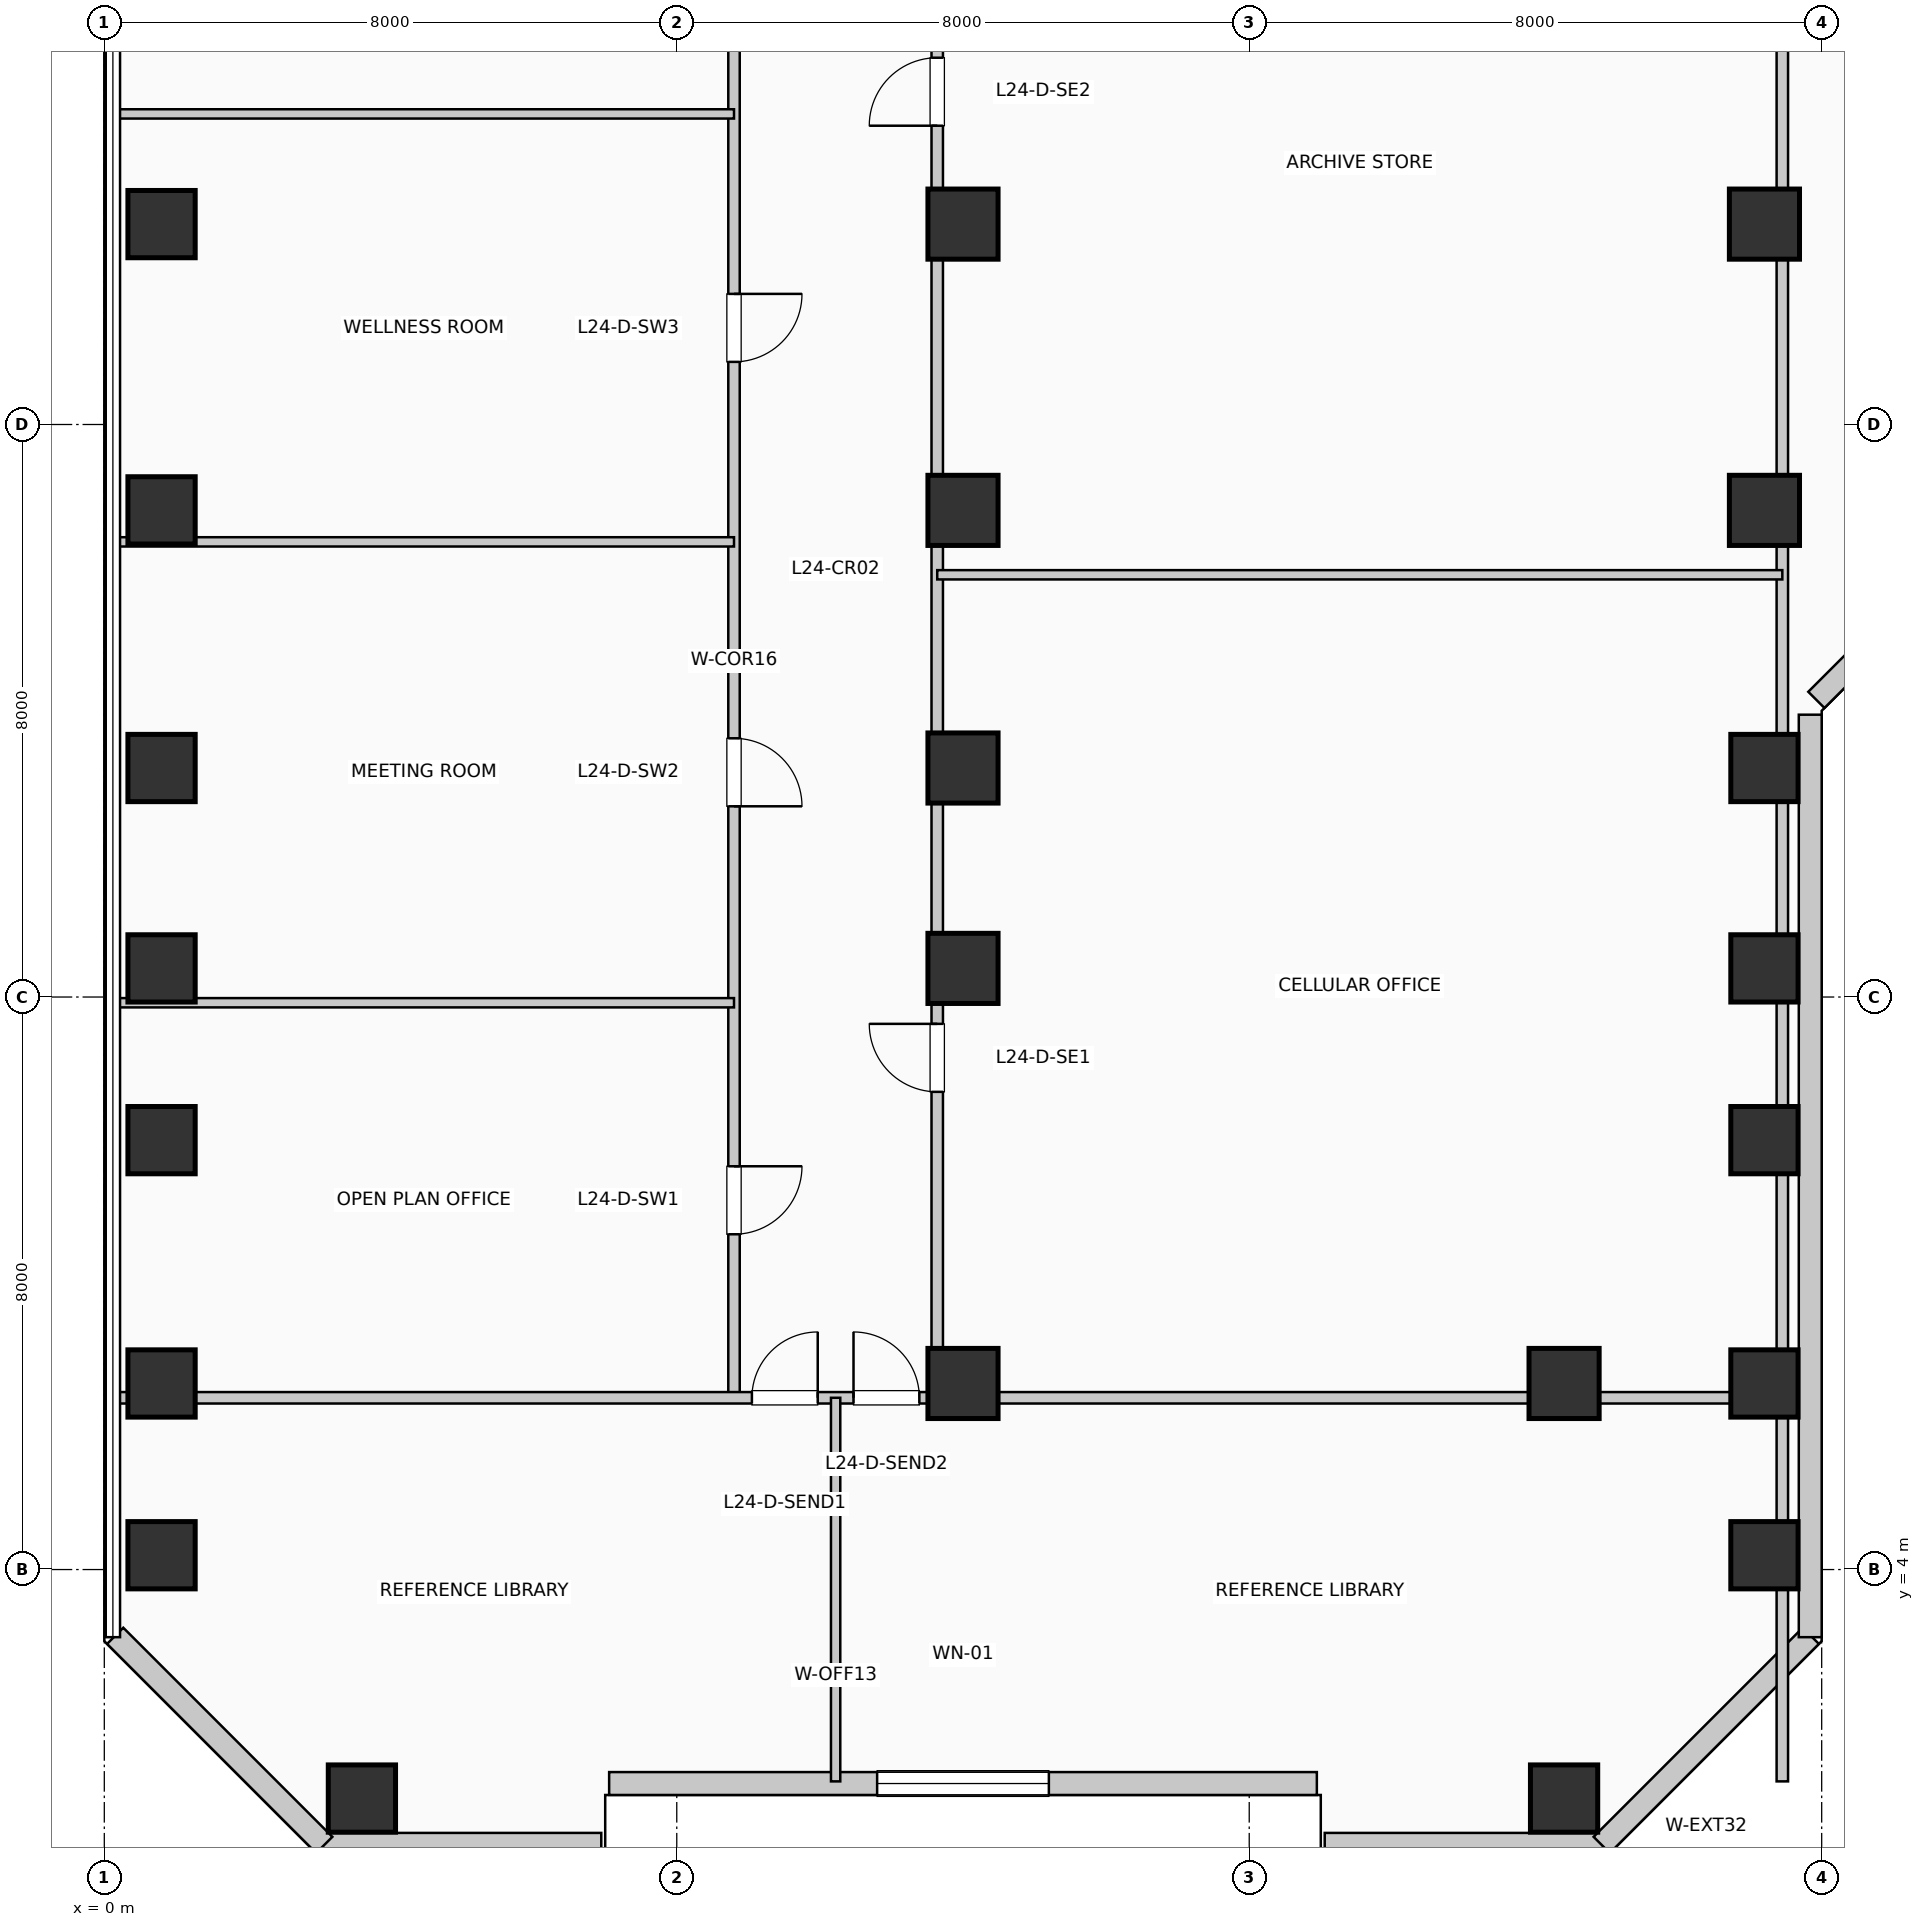
"""IFC4 building model, lengths in metres.
Left out: names, types, materials, properties, quantities, classifications, styles, units other than length and angle.
Written with IfcOpenShell. Run it as: python <this file> out.ifc"""

import sys

from ifc_helpers import new_model, si_unit, direction, frame, frame_2d, origin, origin_2d, place, context, subcontext, project, spatial, rectangle, extrude, element, fill, save


model = new_model("IFC4")
c1 = context("Model", 3, precision=1e-05, world=origin(), true_north=direction((0.0, 1.0)))
c2 = subcontext(c1, "Body", "Model", "MODEL_VIEW")
j1 = project(units=[si_unit("LENGTHUNIT", "METRE"), si_unit("PLANEANGLEUNIT", "RADIAN")], contexts=[c1])
p1 = place(None, origin())
s1 = spatial("IfcSite", under=j1, at=p1, CompositionType="ELEMENT")
p2 = place(p1, origin())
s2 = spatial("IfcBuilding", under=s1, at=p2, CompositionType="ELEMENT")
p3 = place(p2, frame((0.0, 0.0, 102.63)))
s3 = spatial("IfcBuildingStorey", under=s2, at=p3, CompositionType="ELEMENT", Elevation=102.63)
for number, where, z_axis, x_axis in (
    (1, (0.8, 4.2, 0.0), (0.0, 0.0, 1.0), (1.0, 0.0, 0.0)),
    (2, (0.8, 6.6, 0.0), (0.0, 0.0, 1.0), (1.0, 0.0, 0.0)),
    (3, (0.8, 10.0, 0.0), (0.0, 0.0, 1.0), (1.0, 0.0, 0.0)),
    (4, (0.8, 12.4, 0.0), (0.0, 0.0, 1.0), (1.0, 0.0, 0.0)),
    (5, (0.8, 15.2, 0.0), (0.0, 0.0, 1.0), (1.0, 0.0, 0.0)),
    (6, (0.8, 18.8, 0.0), (0.0, 0.0, 1.0), (1.0, 0.0, 0.0)),
    (7, (0.8, 22.8, 0.0), (0.0, 0.0, 1.0), (1.0, 0.0, 0.0)),
    (8, (3.6, 0.8, 0.0), (0.0, 0.0, 1.0), (1.0, 0.0, 0.0)),
):
    element("IfcColumn", number, at=place(p3, frame(where, z_axis=z_axis, x_axis=x_axis)), inside=s3, PredefinedType="COLUMN", context=c2, shape_type="SweptSolid", body=[
        extrude(rectangle(XDim=0.94, YDim=0.94, at=origin_2d()), origin(), (0.0, 0.0, 1.0), 3.96),
    ])
for number, where, z_axis, x_axis in (
    (9, (12.0, 6.6, 0.0), (0.0, 0.0, 1.0), (1.0, 0.0, 0.0)),
    (10, (12.0, 12.4, 0.0), (0.0, 0.0, 1.0), (1.0, 0.0, 0.0)),
    (11, (12.0, 15.2, 0.0), (0.0, 0.0, 1.0), (1.0, 0.0, 0.0)),
    (12, (12.0, 18.8, 0.0), (0.0, 0.0, 1.0), (1.0, 0.0, 0.0)),
    (13, (12.0, 22.8, 0.0), (0.0, 0.0, 1.0), (1.0, 0.0, 0.0)),
):
    element("IfcColumn", number, at=place(p3, frame(where, z_axis=z_axis, x_axis=x_axis)), inside=s3, PredefinedType="COLUMN", context=c2, shape_type="SweptSolid", body=[
        extrude(rectangle(XDim=0.98, YDim=0.98, at=origin_2d()), origin(), (0.0, 0.0, 1.0), 3.96),
    ])
p4 = place(p3, frame((20.4, 0.8, 0.0), z_axis=(0.0, 0.0, 1.0), x_axis=(1.0, 0.0, 0.0)))
e14 = element("IfcColumn", 14, at=p4, inside=s3, PredefinedType="COLUMN", context=c2, shape_type="SweptSolid", body=[
    extrude(rectangle(XDim=0.94, YDim=0.94, at=origin_2d()), origin(), (0.0, 0.0, 1.0), 3.96),
])
p5 = place(p3, frame((20.4, 6.6, 0.0), z_axis=(0.0, 0.0, 1.0), x_axis=(1.0, 0.0, 0.0)))
e15 = element("IfcColumn", 15, at=p5, inside=s3, PredefinedType="COLUMN", context=c2, shape_type="SweptSolid", body=[
    extrude(rectangle(XDim=0.98, YDim=0.98, at=origin_2d()), origin(), (0.0, 0.0, 1.0), 3.96),
])
for number, where, z_axis, x_axis in (
    (16, (23.2, 4.2, 0.0), (0.0, 0.0, 1.0), (1.0, 0.0, 0.0)),
    (17, (23.2, 6.6, 0.0), (0.0, 0.0, 1.0), (1.0, 0.0, 0.0)),
    (18, (23.2, 10.0, 0.0), (0.0, 0.0, 1.0), (1.0, 0.0, 0.0)),
    (19, (23.2, 12.4, 0.0), (0.0, 0.0, 1.0), (1.0, 0.0, 0.0)),
    (20, (23.2, 15.2, 0.0), (0.0, 0.0, 1.0), (1.0, 0.0, 0.0)),
):
    element("IfcColumn", number, at=place(p3, frame(where, z_axis=z_axis, x_axis=x_axis)), inside=s3, PredefinedType="COLUMN", context=c2, shape_type="SweptSolid", body=[
        extrude(rectangle(XDim=0.94, YDim=0.94, at=origin_2d()), origin(), (0.0, 0.0, 1.0), 3.96),
    ])
for number, where, z_axis, x_axis in (
    (21, (23.2, 18.8, 0.0), (0.0, 0.0, 1.0), (1.0, 0.0, 0.0)),
    (22, (23.2, 22.8, 0.0), (0.0, 0.0, 1.0), (1.0, 0.0, 0.0)),
):
    element("IfcColumn", number, at=place(p3, frame(where, z_axis=z_axis, x_axis=x_axis)), inside=s3, PredefinedType="COLUMN", context=c2, shape_type="SweptSolid", body=[
        extrude(rectangle(XDim=0.98, YDim=0.98, at=origin_2d()), origin(), (0.0, 0.0, 1.0), 3.96),
    ])
p6 = place(p3, frame((3.055, 0.16, 0.0), z_axis=(0.0, 0.0, 1.0), x_axis=(1.0, 0.0, 0.0)))
e23 = element("IfcWall", 23, at=p6, inside=s3, PredefinedType="SOLIDWALL", context=c2, shape_type="SweptSolid", body=[
    extrude(rectangle(XDim=3.89, YDim=0.32, at=frame_2d((1.945, 0.0))), origin(), (0.0, 0.0, 1.0), 3.71),
])
p7 = place(p3, frame((7.055, 1.01, 0.0), z_axis=(0.0, 0.0, 1.0), x_axis=(1.0, 0.0, 0.0)))
e24 = element("IfcWall", 24, at=p7, inside=s3, PredefinedType="SOLIDWALL", context=c2, shape_type="SweptSolid", body=[
    extrude(rectangle(XDim=9.89, YDim=0.32, at=frame_2d((4.945, 0.0))), origin(), (0.0, 0.0, 1.0), 3.71),
])
p8 = place(p7, frame((3.745, 0.0, 0.85)))
e25 = element("IfcOpeningElement", 25, at=p8, cuts=e24, PredefinedType="OPENING", context=c2, shape_type="SweptSolid", body=[
    extrude(rectangle(XDim=2.4, YDim=2.05, at=frame_2d((1.2, 1.025))), frame((0.0, 0.17, 0.0), z_axis=(0.0, -1.0, 0.0), x_axis=(1.0, 0.0, 0.0)), (0.0, 0.0, 1.0), 0.34),
])
p9 = place(p3, frame((17.055, 0.16, 0.0), z_axis=(0.0, 0.0, 1.0), x_axis=(1.0, 0.0, 0.0)))
e26 = element("IfcWall", 26, at=p9, inside=s3, PredefinedType="SOLIDWALL", context=c2, shape_type="SweptSolid", body=[
    extrude(rectangle(XDim=3.89, YDim=0.32, at=frame_2d((1.945, 0.0))), origin(), (0.0, 0.0, 1.0), 3.71),
])
p10 = place(p3, frame((20.926, 0.152, 0.0), z_axis=(0.0, 0.0, 1.0), x_axis=(0.707106781187, 0.707106781187, 0.0)))
e27 = element("IfcWall", 27, at=p10, inside=s3, PredefinedType="SOLIDWALL", context=c2, shape_type="SweptSolid", body=[
    extrude(rectangle(XDim=4.133, YDim=0.32, at=frame_2d((2.066, 0.0))), origin(), (0.0, 0.0, 1.0), 3.71),
])
p11 = place(p3, frame((23.84, 3.055, 0.0), z_axis=(0.0, 0.0, 1.0), x_axis=(0.0, 1.0, 0.0)))
e28 = element("IfcWall", 28, at=p11, inside=s3, PredefinedType="SOLIDWALL", context=c2, shape_type="SweptSolid", body=[
    extrude(rectangle(XDim=12.89, YDim=0.32, at=frame_2d((6.445, 0.0))), origin(), (0.0, 0.0, 1.0), 3.71),
])
p12 = place(p3, frame((23.926, 16.152, 0.0), z_axis=(0.0, 0.0, 1.0), x_axis=(0.707106781187, 0.707106781187, 0.0)))
e29 = element("IfcWall", 29, at=p12, inside=s3, PredefinedType="SOLIDWALL", context=c2, shape_type="SweptSolid", body=[
    extrude(rectangle(XDim=2.718, YDim=0.32, at=frame_2d((1.359, 0.0))), origin(), (0.0, 0.0, 1.0), 3.71),
])
p13 = place(p3, frame((0.152, 3.074, 0.0), z_axis=(0.0, 0.0, 1.0), x_axis=(0.707106781187, -0.707106781187, 0.0)))
e30 = element("IfcWall", 30, at=p13, inside=s3, PredefinedType="SOLIDWALL", context=c2, shape_type="SweptSolid", body=[
    extrude(rectangle(XDim=4.133, YDim=0.32, at=frame_2d((2.066, 0.0))), origin(), (0.0, 0.0, 1.0), 3.71),
])
p14 = place(p3, frame((8.8, 6.4, 0.0), z_axis=(0.0, 0.0, 1.0), x_axis=(0.0, 1.0, 0.0)))
e31 = element("IfcWall", 31, at=p14, inside=s3, PredefinedType="PARTITIONING", context=c2, shape_type="SweptSolid", body=[
    extrude(rectangle(XDim=23.0, YDim=0.16, at=frame_2d((11.5, 0.0))), origin(), (0.0, 0.0, 1.0), 3.71),
])
p15 = place(p14, frame((3.235, 0.0, 0.0), z_axis=(0.0, 0.0, 1.0), x_axis=(-1.0, 0.0, 0.0)))
e32 = element("IfcOpeningElement", 32, at=p15, cuts=e31, PredefinedType="OPENING", context=c2, shape_type="SweptSolid", body=[
    extrude(rectangle(XDim=0.95, YDim=2.15, at=frame_2d((0.475, 1.075))), frame((0.0, 0.09, 0.0), z_axis=(0.0, -1.0, 0.0), x_axis=(1.0, 0.0, 0.0)), (0.0, 0.0, 1.0), 0.18),
])
p16 = place(p14, frame((9.215, 0.0, 0.0), z_axis=(0.0, 0.0, 1.0), x_axis=(-1.0, 0.0, 0.0)))
e33 = element("IfcOpeningElement", 33, at=p16, cuts=e31, PredefinedType="OPENING", context=c2, shape_type="SweptSolid", body=[
    extrude(rectangle(XDim=0.95, YDim=2.15, at=frame_2d((0.475, 1.075))), frame((0.0, 0.09, 0.0), z_axis=(0.0, -1.0, 0.0), x_axis=(1.0, 0.0, 0.0)), (0.0, 0.0, 1.0), 0.18),
])
p17 = place(p14, frame((15.425, 0.0, 0.0), z_axis=(0.0, 0.0, 1.0), x_axis=(-1.0, 0.0, 0.0)))
e34 = element("IfcOpeningElement", 34, at=p17, cuts=e31, PredefinedType="OPENING", context=c2, shape_type="SweptSolid", body=[
    extrude(rectangle(XDim=0.95, YDim=2.15, at=frame_2d((0.475, 1.075))), frame((0.0, 0.09, 0.0), z_axis=(0.0, -1.0, 0.0), x_axis=(1.0, 0.0, 0.0)), (0.0, 0.0, 1.0), 0.18),
])
p18 = place(p14, frame((20.945, 0.0, 0.0), z_axis=(0.0, 0.0, 1.0), x_axis=(-1.0, 0.0, 0.0)))
e35 = element("IfcOpeningElement", 35, at=p18, cuts=e31, PredefinedType="OPENING", context=c2, shape_type="SweptSolid", body=[
    extrude(rectangle(XDim=0.95, YDim=2.15, at=frame_2d((0.475, 1.075))), frame((0.0, 0.09, 0.0), z_axis=(0.0, -1.0, 0.0), x_axis=(1.0, 0.0, 0.0)), (0.0, 0.0, 1.0), 0.18),
])
p19 = place(p3, frame((11.64, 6.4, 0.0), z_axis=(0.0, 0.0, 1.0), x_axis=(0.0, 1.0, 0.0)))
e36 = element("IfcWall", 36, at=p19, inside=s3, PredefinedType="PARTITIONING", context=c2, shape_type="SweptSolid", body=[
    extrude(rectangle(XDim=23.0, YDim=0.16, at=frame_2d((11.5, 0.0))), origin(), (0.0, 0.0, 1.0), 2.995),
])
p20 = place(p19, frame((4.275, 0.0, 0.0)))
e37 = element("IfcOpeningElement", 37, at=p20, cuts=e36, PredefinedType="OPENING", context=c2, shape_type="SweptSolid", body=[
    extrude(rectangle(XDim=0.95, YDim=2.15, at=frame_2d((0.475, 1.075))), frame((0.0, 0.09, 0.0), z_axis=(0.0, -1.0, 0.0), x_axis=(1.0, 0.0, 0.0)), (0.0, 0.0, 1.0), 0.18),
])
p21 = place(p19, frame((17.775, 0.0, 0.0)))
e38 = element("IfcOpeningElement", 38, at=p21, cuts=e36, PredefinedType="OPENING", context=c2, shape_type="SweptSolid", body=[
    extrude(rectangle(XDim=0.95, YDim=2.15, at=frame_2d((0.475, 1.075))), frame((0.0, 0.09, 0.0), z_axis=(0.0, -1.0, 0.0), x_axis=(1.0, 0.0, 0.0)), (0.0, 0.0, 1.0), 0.18),
])
p22 = place(p3, frame((0.19, 6.4, 0.0), z_axis=(0.0, 0.0, 1.0), x_axis=(1.0, 0.0, 0.0)))
e39 = element("IfcWall", 39, at=p22, inside=s3, PredefinedType="PARTITIONING", context=c2, shape_type="SweptSolid", body=[
    extrude(rectangle(XDim=23.26, YDim=0.16, at=frame_2d((11.63, 0.0))), origin(), (0.0, 0.0, 1.0), 2.995),
])
p23 = place(p22, frame((8.86, 0.0, 0.0)))
e40 = element("IfcOpeningElement", 40, at=p23, cuts=e39, PredefinedType="OPENING", context=c2, shape_type="SweptSolid", body=[
    extrude(rectangle(XDim=0.92, YDim=2.1, at=frame_2d((0.46, 1.05))), frame((0.0, 0.09, 0.0), z_axis=(0.0, -1.0, 0.0), x_axis=(1.0, 0.0, 0.0)), (0.0, 0.0, 1.0), 0.18),
])
p24 = place(p22, frame((10.28, 0.0, 0.0)))
e41 = element("IfcOpeningElement", 41, at=p24, cuts=e39, PredefinedType="OPENING", context=c2, shape_type="SweptSolid", body=[
    extrude(rectangle(XDim=0.92, YDim=2.1, at=frame_2d((0.46, 1.05))), frame((0.0, 0.09, 0.0), z_axis=(0.0, -1.0, 0.0), x_axis=(1.0, 0.0, 0.0)), (0.0, 0.0, 1.0), 0.18),
])
p25 = place(p3, frame((23.45, 1.04, 0.0), z_axis=(0.0, 0.0, 1.0), x_axis=(0.0, 1.0, 0.0)))
e42 = element("IfcWall", 42, at=p25, inside=s3, PredefinedType="PARTITIONING", context=c2, shape_type="SweptSolid", body=[
    extrude(rectangle(XDim=28.36, YDim=0.16, at=frame_2d((14.18, 0.0))), origin(), (0.0, 0.0, 1.0), 2.995),
])
p26 = place(p3, frame((10.22, 1.04, 0.0), z_axis=(0.0, 0.0, 1.0), x_axis=(0.0, 1.0, 0.0)))
e43 = element("IfcWall", 43, at=p26, inside=s3, PredefinedType="PARTITIONING", context=c2, shape_type="SweptSolid", body=[
    extrude(rectangle(XDim=5.36, YDim=0.13, at=frame_2d((2.68, 0.0))), origin(), (0.0, 0.0, 1.0), 3.71),
])
p27 = place(p3, frame((0.19, 11.92, 0.0), z_axis=(0.0, 0.0, 1.0), x_axis=(1.0, 0.0, 0.0)))
e44 = element("IfcWall", 44, at=p27, inside=s3, PredefinedType="PARTITIONING", context=c2, shape_type="SweptSolid", body=[
    extrude(rectangle(XDim=8.61, YDim=0.13, at=frame_2d((4.305, 0.0))), origin(), (0.0, 0.0, 1.0), 3.71),
])
p28 = place(p3, frame((0.19, 18.36, 0.0), z_axis=(0.0, 0.0, 1.0), x_axis=(1.0, 0.0, 0.0)))
e45 = element("IfcWall", 45, at=p28, inside=s3, PredefinedType="PARTITIONING", context=c2, shape_type="SweptSolid", body=[
    extrude(rectangle(XDim=8.61, YDim=0.13, at=frame_2d((4.305, 0.0))), origin(), (0.0, 0.0, 1.0), 2.995),
])
p29 = place(p3, frame((0.19, 24.34, 0.0), z_axis=(0.0, 0.0, 1.0), x_axis=(1.0, 0.0, 0.0)))
e46 = element("IfcWall", 46, at=p29, inside=s3, PredefinedType="PARTITIONING", context=c2, shape_type="SweptSolid", body=[
    extrude(rectangle(XDim=8.61, YDim=0.13, at=frame_2d((4.305, 0.0))), origin(), (0.0, 0.0, 1.0), 3.71),
])
p30 = place(p3, frame((11.64, 17.9, 0.0), z_axis=(0.0, 0.0, 1.0), x_axis=(1.0, 0.0, 0.0)))
e47 = element("IfcWall", 47, at=p30, inside=s3, PredefinedType="PARTITIONING", context=c2, shape_type="SweptSolid", body=[
    extrude(rectangle(XDim=11.81, YDim=0.13, at=frame_2d((5.905, 0.0))), origin(), (0.0, 0.0, 1.0), 3.71),
])
p31 = place(p8, origin())
e48 = element("IfcWindow", 48, at=p31, inside=s3, PartitioningType="SINGLE_PANEL", PredefinedType="WINDOW", context=c2, shape_type="SweptSolid", body=[
    extrude(rectangle(XDim=2.4, YDim=2.05, at=frame_2d((1.2, 1.025))), frame((0.0, 0.03, 0.0), z_axis=(0.0, -1.0, 0.0), x_axis=(1.0, 0.0, 0.0)), (0.0, 0.0, 1.0), 0.06),
])
fill(e25, e48)
p32 = place(p23, origin())
e49 = element("IfcDoor", 49, at=p32, inside=s3, OperationType="SINGLE_SWING_RIGHT", PredefinedType="DOOR", context=c2, shape_type="SweptSolid", body=[
    extrude(rectangle(XDim=0.92, YDim=2.1, at=frame_2d((0.46, 1.05))), frame((0.0, 0.025, 0.0), z_axis=(0.0, -1.0, 0.0), x_axis=(1.0, 0.0, 0.0)), (0.0, 0.0, 1.0), 0.05),
])
fill(e40, e49)
p33 = place(p24, origin())
e50 = element("IfcDoor", 50, at=p33, inside=s3, OperationType="SINGLE_SWING_LEFT", PredefinedType="DOOR", context=c2, shape_type="SweptSolid", body=[
    extrude(rectangle(XDim=0.92, YDim=2.1, at=frame_2d((0.46, 1.05))), frame((0.0, 0.025, 0.0), z_axis=(0.0, -1.0, 0.0), x_axis=(1.0, 0.0, 0.0)), (0.0, 0.0, 1.0), 0.05),
])
fill(e41, e50)
p34 = place(p15, origin())
e51 = element("IfcDoor", 51, at=p34, inside=s3, OperationType="SINGLE_SWING_RIGHT", PredefinedType="DOOR", context=c2, shape_type="SweptSolid", body=[
    extrude(rectangle(XDim=0.95, YDim=2.15, at=frame_2d((0.475, 1.075))), frame((0.0, 0.025, 0.0), z_axis=(0.0, -1.0, 0.0), x_axis=(1.0, 0.0, 0.0)), (0.0, 0.0, 1.0), 0.05),
])
fill(e32, e51)
p35 = place(p16, origin())
e52 = element("IfcDoor", 52, at=p35, inside=s3, OperationType="SINGLE_SWING_LEFT", PredefinedType="DOOR", context=c2, shape_type="SweptSolid", body=[
    extrude(rectangle(XDim=0.95, YDim=2.15, at=frame_2d((0.475, 1.075))), frame((0.0, 0.025, 0.0), z_axis=(0.0, -1.0, 0.0), x_axis=(1.0, 0.0, 0.0)), (0.0, 0.0, 1.0), 0.05),
])
fill(e33, e52)
p36 = place(p17, origin())
e53 = element("IfcDoor", 53, at=p36, inside=s3, OperationType="SINGLE_SWING_RIGHT", PredefinedType="DOOR", context=c2, shape_type="SweptSolid", body=[
    extrude(rectangle(XDim=0.95, YDim=2.15, at=frame_2d((0.475, 1.075))), frame((0.0, 0.025, 0.0), z_axis=(0.0, -1.0, 0.0), x_axis=(1.0, 0.0, 0.0)), (0.0, 0.0, 1.0), 0.05),
])
fill(e34, e53)
p37 = place(p20, origin())
e54 = element("IfcDoor", 54, at=p37, inside=s3, OperationType="SINGLE_SWING_RIGHT", PredefinedType="DOOR", context=c2, shape_type="SweptSolid", body=[
    extrude(rectangle(XDim=0.95, YDim=2.15, at=frame_2d((0.475, 1.075))), frame((0.0, 0.025, 0.0), z_axis=(0.0, -1.0, 0.0), x_axis=(1.0, 0.0, 0.0)), (0.0, 0.0, 1.0), 0.05),
])
fill(e37, e54)
p38 = place(p21, origin())
e55 = element("IfcDoor", 55, at=p38, inside=s3, OperationType="SINGLE_SWING_LEFT", PredefinedType="DOOR", context=c2, shape_type="SweptSolid", body=[
    extrude(rectangle(XDim=0.95, YDim=2.15, at=frame_2d((0.475, 1.075))), frame((0.0, 0.025, 0.0), z_axis=(0.0, -1.0, 0.0), x_axis=(1.0, 0.0, 0.0)), (0.0, 0.0, 1.0), 0.05),
])
fill(e38, e55)
save(model, sys.argv[1])
